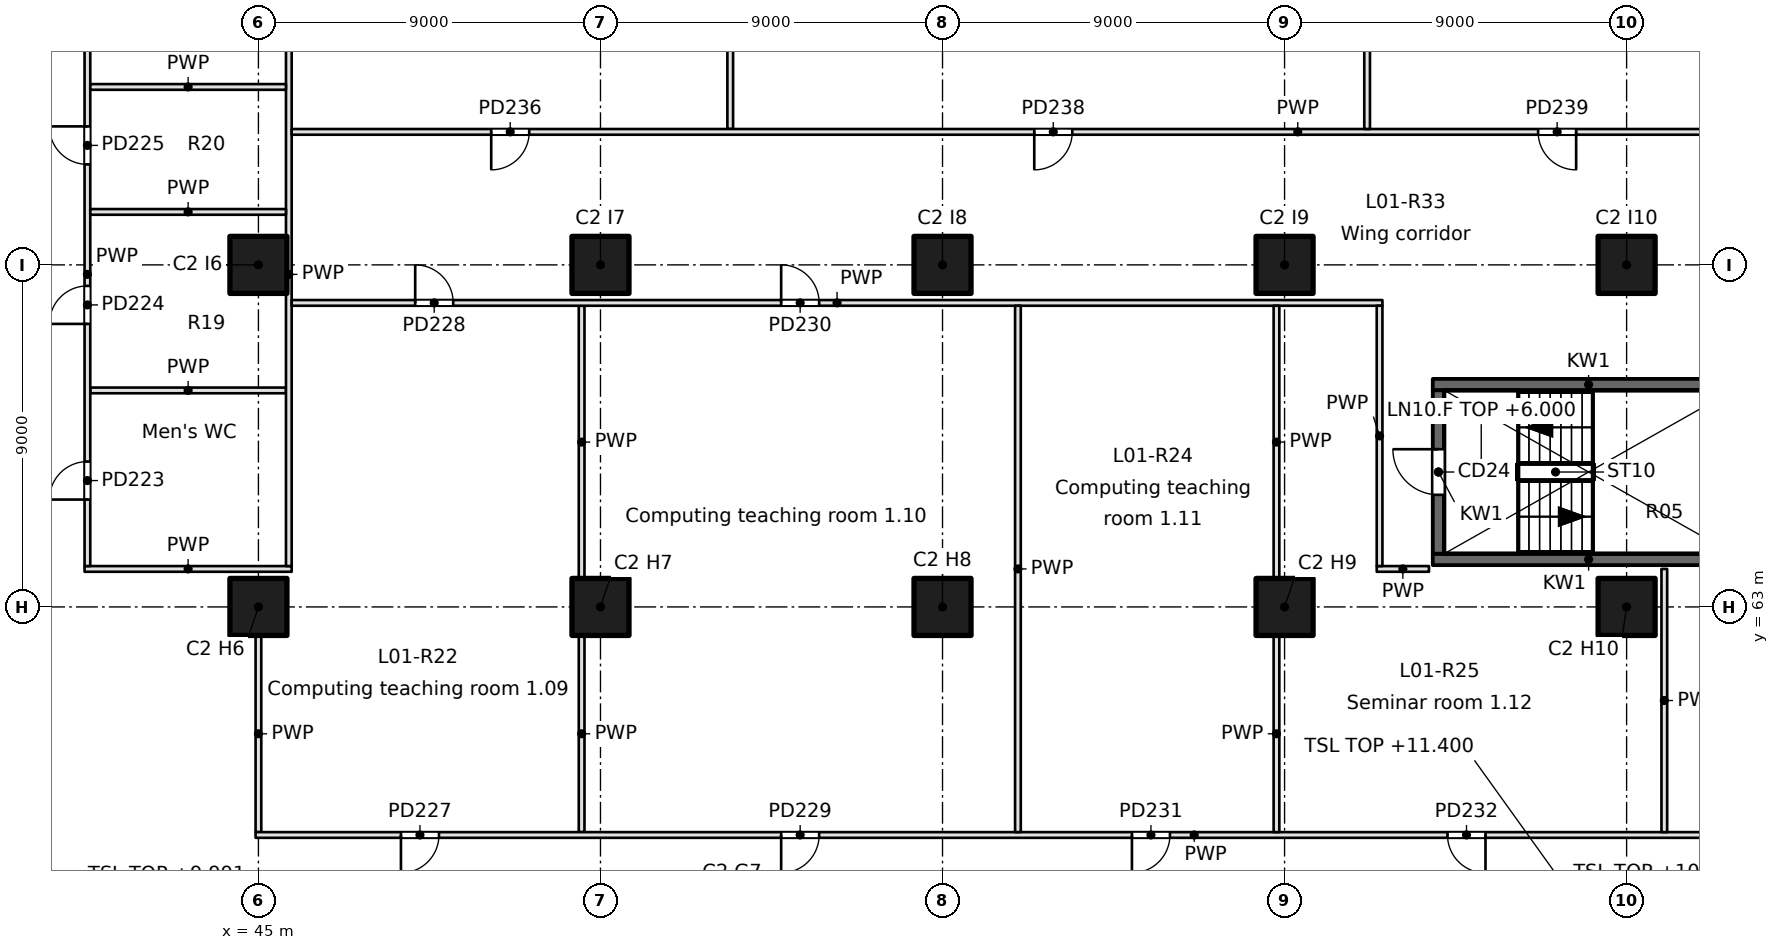
"""IFC4 building model, lengths in metres.
Left out: names, types, materials, properties, quantities, classifications, styles, units other than length and angle.
Written with IfcOpenShell. Run it as: python <this file> out.ifc"""

import sys

from ifc_helpers import new_model, si_unit, direction, frame, frame_2d, origin, origin_2d, place, context, subcontext, project, spatial, rectangle, extrude, element, fill, save


model = new_model("IFC4")
c1 = context("Model", 3, precision=1e-05, world=origin(), true_north=direction((0.0, 1.0)))
c2 = subcontext(c1, "Body", "Model", "MODEL_VIEW")
j1 = project(units=[si_unit("LENGTHUNIT", "METRE"), si_unit("PLANEANGLEUNIT", "RADIAN")], contexts=[c1])
p1 = place(None, origin())
s1 = spatial("IfcSite", under=j1, at=p1, CompositionType="ELEMENT")
p2 = place(p1, origin())
s2 = spatial("IfcBuilding", under=s1, at=p2, CompositionType="ELEMENT")
p3 = place(p2, frame((0.0, 0.0, 6.0)))
s3 = spatial("IfcBuildingStorey", under=s2, at=p3, CompositionType="ELEMENT", Elevation=6.0)
for number, where, z_axis, x_axis in (
    (1, (45.0, 63.0, 0.0), (0.0, 0.0, 1.0), (1.0, 0.0, 0.0)),
    (2, (45.0, 72.0, 0.0), (0.0, 0.0, 1.0), (1.0, 0.0, 0.0)),
    (3, (54.0, 63.0, 0.0), (0.0, 0.0, 1.0), (1.0, 0.0, 0.0)),
    (4, (54.0, 72.0, 0.0), (0.0, 0.0, 1.0), (1.0, 0.0, 0.0)),
    (5, (63.0, 63.0, 0.0), (0.0, 0.0, 1.0), (1.0, 0.0, 0.0)),
    (6, (63.0, 72.0, 0.0), (0.0, 0.0, 1.0), (1.0, 0.0, 0.0)),
    (7, (72.0, 63.0, 0.0), (0.0, 0.0, 1.0), (1.0, 0.0, 0.0)),
    (8, (72.0, 72.0, 0.0), (0.0, 0.0, 1.0), (1.0, 0.0, 0.0)),
    (9, (81.0, 63.0, 0.0), (0.0, 0.0, 1.0), (1.0, 0.0, 0.0)),
    (10, (81.0, 72.0, 0.0), (0.0, 0.0, 1.0), (1.0, 0.0, 0.0)),
):
    element("IfcColumn", number, at=place(p3, frame(where, z_axis=z_axis, x_axis=x_axis)), inside=s3, PredefinedType="COLUMN", context=c2, shape_type="SweptSolid", body=[
        extrude(rectangle(XDim=1.5, YDim=1.5, at=origin_2d()), origin(), (0.0, 0.0, 1.0), 5.4),
    ])
for number, where, z_axis, x_axis in (
    (11, (75.9, 64.25, -0.35), (0.0, 0.0, 1.0), (1.0, 0.0, 0.0)),
    (12, (75.9, 68.85, -0.35), (0.0, 0.0, 1.0), (1.0, 0.0, 0.0)),
):
    element("IfcWall", number, at=place(p3, frame(where, z_axis=z_axis, x_axis=x_axis)), inside=s3, PredefinedType="SOLIDWALL", context=c2, shape_type="SweptSolid", body=[
        extrude(rectangle(XDim=8.2, YDim=0.3, at=frame_2d((4.1, 0.0))), origin(), (0.0, 0.0, 1.0), 5.4),
    ])
p4 = place(p3, frame((76.05, 64.4, -0.35), z_axis=(0.0, 0.0, 1.0), x_axis=(0.0, 1.0, 0.0)))
e13 = element("IfcWall", 13, at=p4, inside=s3, PredefinedType="SOLIDWALL", context=c2, shape_type="SweptSolid", body=[
    extrude(rectangle(XDim=4.3, YDim=0.3, at=frame_2d((2.15, 0.0))), origin(), (0.0, 0.0, 1.0), 5.4),
])
p5 = place(p4, frame((1.55, 0.0, 0.35)))
e14 = element("IfcOpeningElement", 14, at=p5, cuts=e13, PredefinedType="OPENING", context=c2, shape_type="SweptSolid", body=[
    extrude(rectangle(XDim=1.2, YDim=2.1, at=frame_2d((0.6, 1.05))), frame((0.0, 0.15, 0.0), z_axis=(0.0, -1.0, 0.0), x_axis=(1.0, 0.0, 0.0)), (0.0, 0.0, 1.0), 0.3),
])
p6 = place(p3, frame((45.0, 57.075, 0.0), z_axis=(0.0, 0.0, 1.0), x_axis=(0.0, 1.0, 0.0)))
e15 = element("IfcWall", 15, at=p6, inside=s3, PredefinedType="PARTITIONING", context=c2, shape_type="SweptSolid", body=[
    extrude(rectangle(XDim=5.175, YDim=0.15, at=frame_2d((2.587, 0.0))), origin(), (0.0, 0.0, 1.0), 5.05),
])
p7 = place(p3, frame((40.575, 68.697, 0.0), z_axis=(0.0, 0.0, 1.0), x_axis=(1.0, 0.0, 0.0)))
e16 = element("IfcWall", 16, at=p7, inside=s3, PredefinedType="PARTITIONING", context=c2, shape_type="SweptSolid", body=[
    extrude(rectangle(XDim=5.15, YDim=0.15, at=frame_2d((2.575, 0.0))), origin(), (0.0, 0.0, 1.0), 5.05),
])
p8 = place(p3, frame((45.875, 64.0, 0.0), z_axis=(0.0, 0.0, 1.0), x_axis=(-1.0, 0.0, 0.0)))
e17 = element("IfcWall", 17, at=p8, inside=s3, PredefinedType="PARTITIONING", context=c2, shape_type="SweptSolid", body=[
    extrude(rectangle(XDim=5.45, YDim=0.15, at=frame_2d((2.725, 0.0))), origin(), (0.0, 0.0, 1.0), 5.05),
])
p9 = place(p3, frame((74.425, 64.0, 0.0), z_axis=(0.0, 0.0, 1.0), x_axis=(1.0, 0.0, 0.0)))
e18 = element("IfcWall", 18, at=p9, inside=s3, PredefinedType="PARTITIONING", context=c2, shape_type="SweptSolid", body=[
    extrude(rectangle(XDim=1.375, YDim=0.15, at=frame_2d((0.688, 0.0))), origin(), (0.0, 0.0, 1.0), 5.05),
])
p10 = place(p3, frame((45.8, 79.425, 0.0), z_axis=(0.0, 0.0, 1.0), x_axis=(0.0, -1.0, 0.0)))
e19 = element("IfcWall", 19, at=p10, inside=s3, PredefinedType="PARTITIONING", context=c2, shape_type="SweptSolid", body=[
    extrude(rectangle(XDim=15.35, YDim=0.15, at=frame_2d((7.675, 0.0))), origin(), (0.0, 0.0, 1.0), 5.05),
])
p11 = place(p3, frame((40.5, 64.075, 0.0), z_axis=(0.0, 0.0, 1.0), x_axis=(0.0, 1.0, 0.0)))
e20 = element("IfcWall", 20, at=p11, inside=s3, PredefinedType="PARTITIONING", context=c2, shape_type="SweptSolid", body=[
    extrude(rectangle(XDim=15.35, YDim=0.15, at=frame_2d((7.675, 0.0))), origin(), (0.0, 0.0, 1.0), 5.05),
])
p12 = place(p11, frame((1.75, 0.0, 0.0)))
e21 = element("IfcOpeningElement", 21, at=p12, cuts=e20, PredefinedType="OPENING", context=c2, shape_type="SweptSolid", body=[
    extrude(rectangle(XDim=1.0, YDim=2.1, at=frame_2d((0.5, 1.05))), frame((0.0, 0.075, 0.0), z_axis=(0.0, -1.0, 0.0), x_axis=(1.0, 0.0, 0.0)), (0.0, 0.0, 1.0), 0.15),
])
p13 = place(p11, frame((6.372, 0.0, 0.0)))
e22 = element("IfcOpeningElement", 22, at=p13, cuts=e20, PredefinedType="OPENING", context=c2, shape_type="SweptSolid", body=[
    extrude(rectangle(XDim=1.0, YDim=2.1, at=frame_2d((0.5, 1.05))), frame((0.0, 0.075, 0.0), z_axis=(0.0, -1.0, 0.0), x_axis=(1.0, 0.0, 0.0)), (0.0, 0.0, 1.0), 0.15),
])
p14 = place(p11, frame((10.569, 0.0, 0.0)))
e23 = element("IfcOpeningElement", 23, at=p14, cuts=e20, PredefinedType="OPENING", context=c2, shape_type="SweptSolid", body=[
    extrude(rectangle(XDim=1.0, YDim=2.1, at=frame_2d((0.5, 1.05))), frame((0.0, 0.075, 0.0), z_axis=(0.0, -1.0, 0.0), x_axis=(1.0, 0.0, 0.0)), (0.0, 0.0, 1.0), 0.15),
])
for number, where, z_axis, x_axis in (
    (24, (40.575, 73.394, 0.0), (0.0, 0.0, 1.0), (1.0, 0.0, 0.0)),
    (25, (40.575, 76.682, 0.0), (0.0, 0.0, 1.0), (1.0, 0.0, 0.0)),
):
    element("IfcWall", number, at=place(p3, frame(where, z_axis=z_axis, x_axis=x_axis)), inside=s3, PredefinedType="PARTITIONING", context=c2, shape_type="SweptSolid", body=[
        extrude(rectangle(XDim=5.15, YDim=0.15, at=frame_2d((2.575, 0.0))), origin(), (0.0, 0.0, 1.0), 5.05),
    ])
p15 = place(p3, frame((53.504, 57.075, 0.0), z_axis=(0.0, 0.0, 1.0), x_axis=(0.0, 1.0, 0.0)))
e26 = element("IfcWall", 26, at=p15, inside=s3, PredefinedType="PARTITIONING", context=c2, shape_type="SweptSolid", body=[
    extrude(rectangle(XDim=5.175, YDim=0.15, at=frame_2d((2.587, 0.0))), origin(), (0.0, 0.0, 1.0), 5.05),
])
p16 = place(p3, frame((53.504, 63.75, 0.0), z_axis=(0.0, 0.0, 1.0), x_axis=(0.0, 1.0, 0.0)))
e27 = element("IfcWall", 27, at=p16, inside=s3, PredefinedType="PARTITIONING", context=c2, shape_type="SweptSolid", body=[
    extrude(rectangle(XDim=7.175, YDim=0.15, at=frame_2d((3.587, 0.0))), origin(), (0.0, 0.0, 1.0), 5.05),
])
p17 = place(p3, frame((94.32, 57.0, 0.0), z_axis=(0.0, 0.0, 1.0), x_axis=(-1.0, 0.0, 0.0)))
e28 = element("IfcWall", 28, at=p17, inside=s3, PredefinedType="PARTITIONING", context=c2, shape_type="SweptSolid", body=[
    extrude(rectangle(XDim=49.395, YDim=0.15, at=frame_2d((24.698, 0.0))), origin(), (0.0, 0.0, 1.0), 5.05),
])
p18 = place(p17, frame((44.57, 0.0, 0.0)))
e29 = element("IfcOpeningElement", 29, at=p18, cuts=e28, PredefinedType="OPENING", context=c2, shape_type="SweptSolid", body=[
    extrude(rectangle(XDim=1.0, YDim=2.1, at=frame_2d((0.5, 1.05))), frame((0.0, 0.075, 0.0), z_axis=(0.0, -1.0, 0.0), x_axis=(1.0, 0.0, 0.0)), (0.0, 0.0, 1.0), 0.15),
])
p19 = place(p17, frame((34.566, 0.0, 0.0)))
e30 = element("IfcOpeningElement", 30, at=p19, cuts=e28, PredefinedType="OPENING", context=c2, shape_type="SweptSolid", body=[
    extrude(rectangle(XDim=1.0, YDim=2.1, at=frame_2d((0.5, 1.05))), frame((0.0, 0.075, 0.0), z_axis=(0.0, -1.0, 0.0), x_axis=(1.0, 0.0, 0.0)), (0.0, 0.0, 1.0), 0.15),
])
p20 = place(p17, frame((25.336, 0.0, 0.0)))
e31 = element("IfcOpeningElement", 31, at=p20, cuts=e28, PredefinedType="OPENING", context=c2, shape_type="SweptSolid", body=[
    extrude(rectangle(XDim=1.0, YDim=2.1, at=frame_2d((0.5, 1.05))), frame((0.0, 0.075, 0.0), z_axis=(0.0, -1.0, 0.0), x_axis=(1.0, 0.0, 0.0)), (0.0, 0.0, 1.0), 0.15),
])
p21 = place(p17, frame((17.033, 0.0, 0.0)))
e32 = element("IfcOpeningElement", 32, at=p21, cuts=e28, PredefinedType="OPENING", context=c2, shape_type="SweptSolid", body=[
    extrude(rectangle(XDim=1.0, YDim=2.1, at=frame_2d((0.5, 1.05))), frame((0.0, 0.075, 0.0), z_axis=(0.0, -1.0, 0.0), x_axis=(1.0, 0.0, 0.0)), (0.0, 0.0, 1.0), 0.15),
])
p22 = place(p17, frame((7.078, 0.0, 0.0)))
e33 = element("IfcOpeningElement", 33, at=p22, cuts=e28, PredefinedType="OPENING", context=c2, shape_type="SweptSolid", body=[
    extrude(rectangle(XDim=1.0, YDim=2.1, at=frame_2d((0.5, 1.05))), frame((0.0, 0.075, 0.0), z_axis=(0.0, -1.0, 0.0), x_axis=(1.0, 0.0, 0.0)), (0.0, 0.0, 1.0), 0.15),
])
p23 = place(p3, frame((45.875, 71.0, 0.0), z_axis=(0.0, 0.0, 1.0), x_axis=(1.0, 0.0, 0.0)))
e34 = element("IfcWall", 34, at=p23, inside=s3, PredefinedType="PARTITIONING", context=c2, shape_type="SweptSolid", body=[
    extrude(rectangle(XDim=28.7, YDim=0.15, at=frame_2d((14.35, 0.0))), origin(), (0.0, 0.0, 1.0), 5.05),
])
p24 = place(p23, frame((3.25, 0.0, 0.0)))
e35 = element("IfcOpeningElement", 35, at=p24, cuts=e34, PredefinedType="OPENING", context=c2, shape_type="SweptSolid", body=[
    extrude(rectangle(XDim=1.0, YDim=2.1, at=frame_2d((0.5, 1.05))), frame((0.0, 0.075, 0.0), z_axis=(0.0, -1.0, 0.0), x_axis=(1.0, 0.0, 0.0)), (0.0, 0.0, 1.0), 0.15),
])
p25 = place(p23, frame((12.879, 0.0, 0.0)))
e36 = element("IfcOpeningElement", 36, at=p25, cuts=e34, PredefinedType="OPENING", context=c2, shape_type="SweptSolid", body=[
    extrude(rectangle(XDim=1.0, YDim=2.1, at=frame_2d((0.5, 1.05))), frame((0.0, 0.075, 0.0), z_axis=(0.0, -1.0, 0.0), x_axis=(1.0, 0.0, 0.0)), (0.0, 0.0, 1.0), 0.15),
])
p26 = place(p3, frame((64.984, 57.075, 0.0), z_axis=(0.0, 0.0, 1.0), x_axis=(0.0, 1.0, 0.0)))
e37 = element("IfcWall", 37, at=p26, inside=s3, PredefinedType="PARTITIONING", context=c2, shape_type="SweptSolid", body=[
    extrude(rectangle(XDim=13.85, YDim=0.15, at=frame_2d((6.925, 0.0))), origin(), (0.0, 0.0, 1.0), 5.05),
])
p27 = place(p3, frame((71.787, 57.075, 0.0), z_axis=(0.0, 0.0, 1.0), x_axis=(0.0, 1.0, 0.0)))
e38 = element("IfcWall", 38, at=p27, inside=s3, PredefinedType="PARTITIONING", context=c2, shape_type="SweptSolid", body=[
    extrude(rectangle(XDim=5.175, YDim=0.15, at=frame_2d((2.587, 0.0))), origin(), (0.0, 0.0, 1.0), 5.05),
])
p28 = place(p3, frame((71.787, 63.75, 0.0), z_axis=(0.0, 0.0, 1.0), x_axis=(0.0, 1.0, 0.0)))
e39 = element("IfcWall", 39, at=p28, inside=s3, PredefinedType="PARTITIONING", context=c2, shape_type="SweptSolid", body=[
    extrude(rectangle(XDim=7.175, YDim=0.15, at=frame_2d((3.587, 0.0))), origin(), (0.0, 0.0, 1.0), 5.05),
])
p29 = place(p3, frame((81.992, 57.075, 0.0), z_axis=(0.0, 0.0, 1.0), x_axis=(0.0, 1.0, 0.0)))
e40 = element("IfcWall", 40, at=p29, inside=s3, PredefinedType="PARTITIONING", context=c2, shape_type="SweptSolid", body=[
    extrude(rectangle(XDim=6.925, YDim=0.15, at=frame_2d((3.462, 0.0))), origin(), (0.0, 0.0, 1.0), 5.05),
])
p30 = place(p3, frame((74.5, 70.925, 0.0), z_axis=(0.0, 0.0, 1.0), x_axis=(0.0, -1.0, 0.0)))
e41 = element("IfcWall", 41, at=p30, inside=s3, PredefinedType="PARTITIONING", context=c2, shape_type="SweptSolid", body=[
    extrude(rectangle(XDim=6.85, YDim=0.15, at=frame_2d((3.425, 0.0))), origin(), (0.0, 0.0, 1.0), 5.05),
])
p31 = place(p3, frame((57.414, 75.575, 0.0), z_axis=(0.0, 0.0, 1.0), x_axis=(0.0, 1.0, 0.0)))
e42 = element("IfcWall", 42, at=p31, inside=s3, PredefinedType="PARTITIONING", context=c2, shape_type="SweptSolid", body=[
    extrude(rectangle(XDim=17.925, YDim=0.15, at=frame_2d((8.962, 0.0))), origin(), (0.0, 0.0, 1.0), 5.05),
])
p32 = place(p3, frame((98.82, 75.5, 0.0), z_axis=(0.0, 0.0, 1.0), x_axis=(-1.0, 0.0, 0.0)))
e43 = element("IfcWall", 43, at=p32, inside=s3, PredefinedType="PARTITIONING", context=c2, shape_type="SweptSolid", body=[
    extrude(rectangle(XDim=52.945, YDim=0.15, at=frame_2d((26.473, 0.0))), origin(), (0.0, 0.0, 1.0), 5.05),
])
p33 = place(p32, frame((46.695, 0.0, 0.0)))
e44 = element("IfcOpeningElement", 44, at=p33, cuts=e43, PredefinedType="OPENING", context=c2, shape_type="SweptSolid", body=[
    extrude(rectangle(XDim=1.0, YDim=2.1, at=frame_2d((0.5, 1.05))), frame((0.0, 0.075, 0.0), z_axis=(0.0, -1.0, 0.0), x_axis=(1.0, 0.0, 0.0)), (0.0, 0.0, 1.0), 0.15),
])
p34 = place(p32, frame((32.406, 0.0, 0.0)))
e45 = element("IfcOpeningElement", 45, at=p34, cuts=e43, PredefinedType="OPENING", context=c2, shape_type="SweptSolid", body=[
    extrude(rectangle(XDim=1.0, YDim=2.1, at=frame_2d((0.5, 1.05))), frame((0.0, 0.075, 0.0), z_axis=(0.0, -1.0, 0.0), x_axis=(1.0, 0.0, 0.0)), (0.0, 0.0, 1.0), 0.15),
])
p35 = place(p32, frame((19.148, 0.0, 0.0)))
e46 = element("IfcOpeningElement", 46, at=p35, cuts=e43, PredefinedType="OPENING", context=c2, shape_type="SweptSolid", body=[
    extrude(rectangle(XDim=1.0, YDim=2.1, at=frame_2d((0.5, 1.05))), frame((0.0, 0.075, 0.0), z_axis=(0.0, -1.0, 0.0), x_axis=(1.0, 0.0, 0.0)), (0.0, 0.0, 1.0), 0.15),
])
p36 = place(p32, frame((6.967, 0.0, 0.0)))
e47 = element("IfcOpeningElement", 47, at=p36, cuts=e43, PredefinedType="OPENING", context=c2, shape_type="SweptSolid", body=[
    extrude(rectangle(XDim=1.0, YDim=2.1, at=frame_2d((0.5, 1.05))), frame((0.0, 0.075, 0.0), z_axis=(0.0, -1.0, 0.0), x_axis=(1.0, 0.0, 0.0)), (0.0, 0.0, 1.0), 0.15),
])
p37 = place(p3, frame((74.172, 75.575, 0.0), z_axis=(0.0, 0.0, 1.0), x_axis=(0.0, 1.0, 0.0)))
e48 = element("IfcWall", 48, at=p37, inside=s3, PredefinedType="PARTITIONING", context=c2, shape_type="SweptSolid", body=[
    extrude(rectangle(XDim=17.925, YDim=0.15, at=frame_2d((8.962, 0.0))), origin(), (0.0, 0.0, 1.0), 5.05),
])
p38 = place(p5, origin())
e49 = element("IfcDoor", 49, at=p38, inside=s3, OperationType="SINGLE_SWING_RIGHT", PredefinedType="DOOR", context=c2, shape_type="SweptSolid", body=[
    extrude(rectangle(XDim=1.2, YDim=2.1, at=frame_2d((0.6, 1.05))), frame((0.0, 0.025, 0.0), z_axis=(0.0, -1.0, 0.0), x_axis=(1.0, 0.0, 0.0)), (0.0, 0.0, 1.0), 0.05),
])
fill(e14, e49)
p39 = place(p12, origin())
e50 = element("IfcDoor", 50, at=p39, inside=s3, OperationType="SINGLE_SWING_LEFT", PredefinedType="DOOR", context=c2, shape_type="SweptSolid", body=[
    extrude(rectangle(XDim=1.0, YDim=2.1, at=frame_2d((0.5, 1.05))), frame((0.0, 0.025, 0.0), z_axis=(0.0, -1.0, 0.0), x_axis=(1.0, 0.0, 0.0)), (0.0, 0.0, 1.0), 0.05),
])
fill(e21, e50)
p40 = place(p13, origin())
e51 = element("IfcDoor", 51, at=p40, inside=s3, OperationType="SINGLE_SWING_LEFT", PredefinedType="DOOR", context=c2, shape_type="SweptSolid", body=[
    extrude(rectangle(XDim=1.0, YDim=2.1, at=frame_2d((0.5, 1.05))), frame((0.0, 0.025, 0.0), z_axis=(0.0, -1.0, 0.0), x_axis=(1.0, 0.0, 0.0)), (0.0, 0.0, 1.0), 0.05),
])
fill(e22, e51)
p41 = place(p14, origin())
e52 = element("IfcDoor", 52, at=p41, inside=s3, OperationType="SINGLE_SWING_RIGHT", PredefinedType="DOOR", context=c2, shape_type="SweptSolid", body=[
    extrude(rectangle(XDim=1.0, YDim=2.1, at=frame_2d((0.5, 1.05))), frame((0.0, 0.025, 0.0), z_axis=(0.0, -1.0, 0.0), x_axis=(1.0, 0.0, 0.0)), (0.0, 0.0, 1.0), 0.05),
])
fill(e23, e52)
p42 = place(p18, origin())
e53 = element("IfcDoor", 53, at=p42, inside=s3, OperationType="SINGLE_SWING_RIGHT", PredefinedType="DOOR", context=c2, shape_type="SweptSolid", body=[
    extrude(rectangle(XDim=1.0, YDim=2.1, at=frame_2d((0.5, 1.05))), frame((0.0, 0.025, 0.0), z_axis=(0.0, -1.0, 0.0), x_axis=(1.0, 0.0, 0.0)), (0.0, 0.0, 1.0), 0.05),
])
fill(e29, e53)
p43 = place(p24, origin())
e54 = element("IfcDoor", 54, at=p43, inside=s3, OperationType="SINGLE_SWING_LEFT", PredefinedType="DOOR", context=c2, shape_type="SweptSolid", body=[
    extrude(rectangle(XDim=1.0, YDim=2.1, at=frame_2d((0.5, 1.05))), frame((0.0, 0.025, 0.0), z_axis=(0.0, -1.0, 0.0), x_axis=(1.0, 0.0, 0.0)), (0.0, 0.0, 1.0), 0.05),
])
fill(e35, e54)
p44 = place(p19, origin())
e55 = element("IfcDoor", 55, at=p44, inside=s3, OperationType="SINGLE_SWING_RIGHT", PredefinedType="DOOR", context=c2, shape_type="SweptSolid", body=[
    extrude(rectangle(XDim=1.0, YDim=2.1, at=frame_2d((0.5, 1.05))), frame((0.0, 0.025, 0.0), z_axis=(0.0, -1.0, 0.0), x_axis=(1.0, 0.0, 0.0)), (0.0, 0.0, 1.0), 0.05),
])
fill(e30, e55)
p45 = place(p25, origin())
e56 = element("IfcDoor", 56, at=p45, inside=s3, OperationType="SINGLE_SWING_LEFT", PredefinedType="DOOR", context=c2, shape_type="SweptSolid", body=[
    extrude(rectangle(XDim=1.0, YDim=2.1, at=frame_2d((0.5, 1.05))), frame((0.0, 0.025, 0.0), z_axis=(0.0, -1.0, 0.0), x_axis=(1.0, 0.0, 0.0)), (0.0, 0.0, 1.0), 0.05),
])
fill(e36, e56)
p46 = place(p20, origin())
e57 = element("IfcDoor", 57, at=p46, inside=s3, OperationType="SINGLE_SWING_RIGHT", PredefinedType="DOOR", context=c2, shape_type="SweptSolid", body=[
    extrude(rectangle(XDim=1.0, YDim=2.1, at=frame_2d((0.5, 1.05))), frame((0.0, 0.025, 0.0), z_axis=(0.0, -1.0, 0.0), x_axis=(1.0, 0.0, 0.0)), (0.0, 0.0, 1.0), 0.05),
])
fill(e31, e57)
p47 = place(p21, origin())
e58 = element("IfcDoor", 58, at=p47, inside=s3, OperationType="SINGLE_SWING_LEFT", PredefinedType="DOOR", context=c2, shape_type="SweptSolid", body=[
    extrude(rectangle(XDim=1.0, YDim=2.1, at=frame_2d((0.5, 1.05))), frame((0.0, 0.025, 0.0), z_axis=(0.0, -1.0, 0.0), x_axis=(1.0, 0.0, 0.0)), (0.0, 0.0, 1.0), 0.05),
])
fill(e32, e58)
p48 = place(p33, origin())
e59 = element("IfcDoor", 59, at=p48, inside=s3, OperationType="SINGLE_SWING_RIGHT", PredefinedType="DOOR", context=c2, shape_type="SweptSolid", body=[
    extrude(rectangle(XDim=1.0, YDim=2.1, at=frame_2d((0.5, 1.05))), frame((0.0, 0.025, 0.0), z_axis=(0.0, -1.0, 0.0), x_axis=(1.0, 0.0, 0.0)), (0.0, 0.0, 1.0), 0.05),
])
fill(e44, e59)
p49 = place(p34, origin())
e60 = element("IfcDoor", 60, at=p49, inside=s3, OperationType="SINGLE_SWING_RIGHT", PredefinedType="DOOR", context=c2, shape_type="SweptSolid", body=[
    extrude(rectangle(XDim=1.0, YDim=2.1, at=frame_2d((0.5, 1.05))), frame((0.0, 0.025, 0.0), z_axis=(0.0, -1.0, 0.0), x_axis=(1.0, 0.0, 0.0)), (0.0, 0.0, 1.0), 0.05),
])
fill(e45, e60)
p50 = place(p35, origin())
e61 = element("IfcDoor", 61, at=p50, inside=s3, OperationType="SINGLE_SWING_LEFT", PredefinedType="DOOR", context=c2, shape_type="SweptSolid", body=[
    extrude(rectangle(XDim=1.0, YDim=2.1, at=frame_2d((0.5, 1.05))), frame((0.0, 0.025, 0.0), z_axis=(0.0, -1.0, 0.0), x_axis=(1.0, 0.0, 0.0)), (0.0, 0.0, 1.0), 0.05),
])
fill(e46, e61)
save(model, sys.argv[1])
